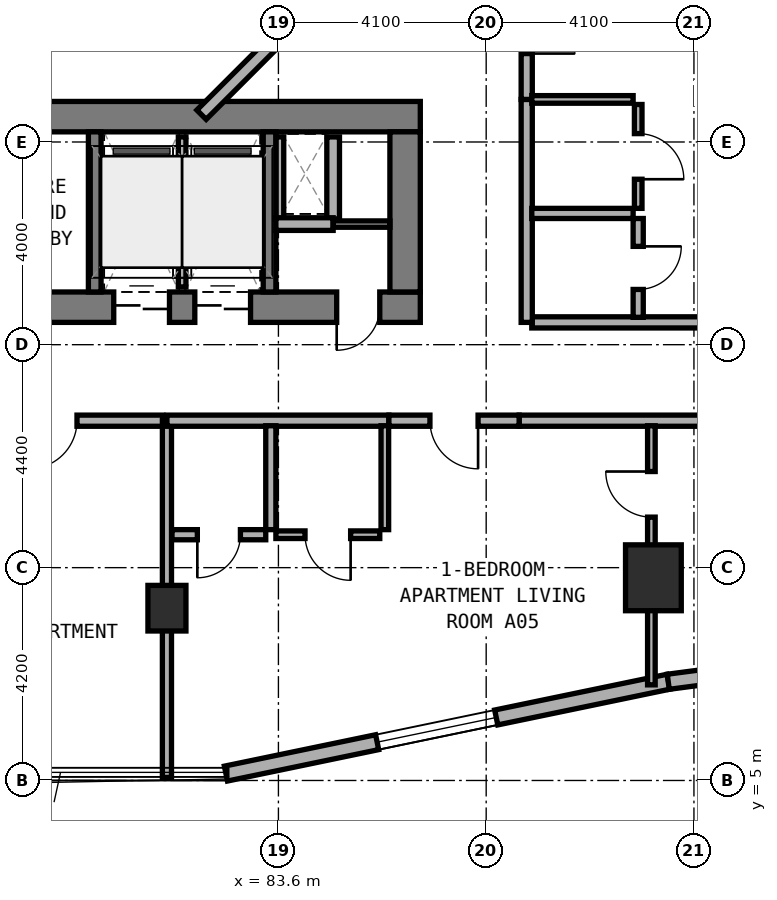
"""IFC4 building model, lengths in metres.
Left out: names, types, materials, properties, quantities, classifications, styles, units other than length and angle.
Written with IfcOpenShell. Run it as: python <this file> out.ifc"""

import sys

from ifc_helpers import new_model, si_unit, direction, frame, frame_2d, origin, origin_2d, place, context, subcontext, project, spatial, rectangle, extrude, element, fill, save


model = new_model("IFC4")
c1 = context("Model", 3, precision=1e-05, world=origin(), true_north=direction((0.0, 1.0)))
c2 = subcontext(c1, "Body", "Model", "MODEL_VIEW")
j1 = project(units=[si_unit("LENGTHUNIT", "METRE"), si_unit("PLANEANGLEUNIT", "RADIAN")], contexts=[c1])
p1 = place(None, origin())
s1 = spatial("IfcSite", under=j1, at=p1, CompositionType="ELEMENT")
p2 = place(p1, origin())
s2 = spatial("IfcBuilding", under=s1, at=p2, CompositionType="ELEMENT")
p3 = place(p2, frame((0.0, 0.0, 52.0)))
s3 = spatial("IfcBuildingStorey", under=s2, at=p3, CompositionType="ELEMENT", Elevation=52.0)
p4 = place(p3, frame((67.8, 14.34, 0.0), z_axis=(0.0, 0.0, 1.0), x_axis=(1.0, 0.0, 0.0)))
e1 = element("IfcWall", 1, at=p4, inside=s3, PredefinedType="SHEAR", context=c2, shape_type="SweptSolid", body=[
    extrude(rectangle(XDim=18.6, YDim=0.6, at=frame_2d((9.3, 0.0))), origin(), (0.0, 0.0, 1.0), 3.5),
])
p5 = place(p4, frame((9.35, 0.0, 0.0)))
e2 = element("IfcOpeningElement", 2, at=p5, cuts=e1, PredefinedType="OPENING", context=c2, shape_type="SweptSolid", body=[
    extrude(rectangle(XDim=1.2, YDim=2.15, at=frame_2d((0.6, 1.075))), frame((0.0, 0.31, 0.0), z_axis=(0.0, -1.0, 0.0), x_axis=(1.0, 0.0, 0.0)), (0.0, 0.0, 1.0), 0.62),
])
p6 = place(p4, frame((16.95, 0.0, 0.0)))
e3 = element("IfcOpeningElement", 3, at=p6, cuts=e1, PredefinedType="OPENING", context=c2, shape_type="SweptSolid", body=[
    extrude(rectangle(XDim=0.85, YDim=2.1, at=frame_2d((0.425, 1.05))), frame((0.0, 0.31, 0.0), z_axis=(0.0, -1.0, 0.0), x_axis=(1.0, 0.0, 0.0)), (0.0, 0.0, 1.0), 0.62),
])
p7 = place(p4, frame((12.55, 0.0, 0.0)))
e4 = element("IfcOpeningElement", 4, at=p7, cuts=e1, PredefinedType="OPENING", context=c2, shape_type="SweptSolid", body=[
    extrude(rectangle(XDim=1.1, YDim=2.15, at=frame_2d((0.55, 1.075))), frame((0.0, 0.31, 0.0), z_axis=(0.0, -1.0, 0.0), x_axis=(1.0, 0.0, 0.0)), (0.0, 0.0, 1.0), 0.62),
])
p8 = place(p4, frame((14.15, 0.0, 0.0)))
e5 = element("IfcOpeningElement", 5, at=p8, cuts=e1, PredefinedType="OPENING", context=c2, shape_type="SweptSolid", body=[
    extrude(rectangle(XDim=1.1, YDim=2.15, at=frame_2d((0.55, 1.075))), frame((0.0, 0.31, 0.0), z_axis=(0.0, -1.0, 0.0), x_axis=(1.0, 0.0, 0.0)), (0.0, 0.0, 1.0), 0.62),
])
p9 = place(p3, frame((67.8, 18.1, 0.0), z_axis=(0.0, 0.0, 1.0), x_axis=(1.0, 0.0, 0.0)))
e6 = element("IfcWall", 6, at=p9, inside=s3, PredefinedType="SHEAR", context=c2, shape_type="SweptSolid", body=[
    extrude(rectangle(XDim=18.6, YDim=0.6, at=frame_2d((9.3, 0.0))), origin(), (0.0, 0.0, 1.0), 3.5),
])
p10 = place(p3, frame((86.1, 14.64, 0.0), z_axis=(0.0, 0.0, 1.0), x_axis=(0.0, 1.0, 0.0)))
e7 = element("IfcWall", 7, at=p10, inside=s3, PredefinedType="SHEAR", context=c2, shape_type="SweptSolid", body=[
    extrude(rectangle(XDim=3.16, YDim=0.6, at=frame_2d((1.58, 0.0))), origin(), (0.0, 0.0, 1.0), 3.5),
])
for number, where, z_axis, x_axis in (
    (8, (79.975, 14.64, 0.0), (0.0, 0.0, 1.0), (0.0, 1.0, 0.0)),
    (9, (83.425, 14.64, 0.0), (0.0, 0.0, 1.0), (0.0, 1.0, 0.0)),
):
    element("IfcWall", number, at=place(p3, frame(where, z_axis=z_axis, x_axis=x_axis)), inside=s3, PredefinedType="STANDARD", context=c2, shape_type="SweptSolid", body=[
        extrude(rectangle(XDim=3.16, YDim=0.25, at=frame_2d((1.58, 0.0))), origin(), (0.0, 0.0, 1.0), 3.25),
    ])
p11 = place(p3, frame((81.4, 8.4, 0.0), z_axis=(0.0, 0.0, 1.0), x_axis=(1.0, 0.0, 0.0)))
e10 = element("IfcColumn", 10, at=p11, inside=s3, PredefinedType="COLUMN", context=c2, shape_type="SweptSolid", body=[
    extrude(rectangle(XDim=0.75, YDim=0.9, at=origin_2d()), origin(), (0.0, 0.0, 1.0), 3.5),
])
p12 = place(p3, frame((91.0, 9.0, 0.0), z_axis=(0.0, 0.0, 1.0), x_axis=(1.0, 0.0, 0.0)))
e11 = element("IfcColumn", 11, at=p12, inside=s3, PredefinedType="COLUMN", context=c2, shape_type="SweptSolid", body=[
    extrude(rectangle(XDim=1.1, YDim=1.3, at=origin_2d()), origin(), (0.0, 0.0, 1.0), 3.5),
])
p13 = place(p3, frame((82.564, 5.136, 0.0), z_axis=(0.0, 0.0, 1.0), x_axis=(0.979128391325, 0.203242695569, 0.0)))
e12 = element("IfcWall", 12, at=p13, inside=s3, PredefinedType="STANDARD", context=c2, shape_type="SweptSolid", body=[
    extrude(rectangle(XDim=8.92, YDim=0.3, at=frame_2d((4.46, 0.0))), origin(), (0.0, 0.0, 1.0), 3.25),
])
p14 = place(p13, frame((3.048, 0.0, 0.8)))
e13 = element("IfcOpeningElement", 13, at=p14, cuts=e12, PredefinedType="OPENING", context=c2, shape_type="SweptSolid", body=[
    extrude(rectangle(XDim=2.4, YDim=1.6, at=frame_2d((1.2, 0.8))), frame((0.0, 0.16, 0.0), z_axis=(0.0, -1.0, 0.0), x_axis=(1.0, 0.0, 0.0)), (0.0, 0.0, 1.0), 0.32),
])
p15 = place(p3, frame((91.293, 6.948, 0.0), z_axis=(0.0, 0.0, 1.0), x_axis=(0.991486167159, 0.13021205909, 0.0)))
e14 = element("IfcWall", 14, at=p15, inside=s3, PredefinedType="STANDARD", context=c2, shape_type="SweptSolid", body=[
    extrude(rectangle(XDim=0.729, YDim=0.3, at=frame_2d((0.365, 0.0))), origin(), (0.0, 0.0, 1.0), 3.25),
])
p16 = place(p3, frame((82.082, 18.138, 0.0), z_axis=(0.0, 0.0, 1.0), x_axis=(0.707106781187, 0.707106781187, 0.0)))
e15 = element("IfcWall", 15, at=p16, inside=s3, PredefinedType="STANDARD", context=c2, shape_type="SweptSolid", body=[
    extrude(rectangle(XDim=2.311, YDim=0.26, at=frame_2d((1.155, 0.0))), origin(), (0.0, 0.0, 1.0), 3.25),
])
p17 = place(p3, frame((83.63, 16.08, 0.0), z_axis=(0.0, 0.0, 1.0), x_axis=(0.0, 1.0, 0.0)))
e16 = element("IfcWall", 16, at=p17, inside=s3, PredefinedType="PARTITIONING", context=c2, shape_type="SweptSolid", body=[
    extrude(rectangle(XDim=1.62, YDim=0.15, at=frame_2d((0.81, 0.0))), origin(), (0.0, 0.0, 1.0), 2.725),
])
p18 = place(p3, frame((84.68, 16.08, 0.0), z_axis=(0.0, 0.0, 1.0), x_axis=(0.0, 1.0, 0.0)))
e17 = element("IfcWall", 17, at=p18, inside=s3, PredefinedType="SOLIDWALL", context=c2, shape_type="SweptSolid", body=[
    extrude(rectangle(XDim=1.62, YDim=0.25, at=frame_2d((0.81, 0.0))), origin(), (0.0, 0.0, 1.0), 3.22),
])
p19 = place(p3, frame((83.55, 15.98, 0.0), z_axis=(0.0, 0.0, 1.0), x_axis=(1.0, 0.0, 0.0)))
e18 = element("IfcWall", 18, at=p19, inside=s3, PredefinedType="SOLIDWALL", context=c2, shape_type="SweptSolid", body=[
    extrude(rectangle(XDim=1.13, YDim=0.25, at=frame_2d((0.565, 0.0))), origin(), (0.0, 0.0, 1.0), 3.22),
])
p20 = place(p3, frame((84.68, 15.98, 0.0), z_axis=(0.0, 0.0, 1.0), x_axis=(1.0, 0.0, 0.0)))
e19 = element("IfcWall", 19, at=p20, inside=s3, PredefinedType="PARTITIONING", context=c2, shape_type="SweptSolid", body=[
    extrude(rectangle(XDim=1.12, YDim=0.125, at=frame_2d((0.56, 0.0))), origin(), (0.0, 0.0, 1.0), 3.22),
])
p21 = place(p3, frame((81.7, 14.74, 0.0), z_axis=(0.0, 0.0, 1.0), x_axis=(0.0, 1.0, 0.0)))
e20 = element("IfcWall", 20, at=p21, inside=s3, PredefinedType="PARTITIONING", context=c2, shape_type="SweptSolid", body=[
    extrude(rectangle(XDim=2.96, YDim=0.15, at=frame_2d((1.48, 0.0))), origin(), (0.0, 0.0, 1.0), 3.22),
])
p22 = place(p3, frame((76.98, 12.1, 0.0), z_axis=(0.0, 0.0, 1.0), x_axis=(1.0, 0.0, 0.0)))
e21 = element("IfcWall", 21, at=p22, inside=s3, PredefinedType="SOLIDWALL", context=c2, shape_type="SweptSolid", body=[
    extrude(rectangle(XDim=4.34, YDim=0.22, at=frame_2d((2.17, 0.0))), origin(), (0.0, 0.0, 1.0), 2.725),
])
p23 = place(p22, frame((1.695, 0.0, 0.0)))
e22 = element("IfcOpeningElement", 22, at=p23, cuts=e21, PredefinedType="OPENING", context=c2, shape_type="SweptSolid", body=[
    extrude(rectangle(XDim=0.95, YDim=2.1, at=frame_2d((0.475, 1.05))), frame((0.0, 0.12, 0.0), z_axis=(0.0, -1.0, 0.0), x_axis=(1.0, 0.0, 0.0)), (0.0, 0.0, 1.0), 0.24),
])
p24 = place(p3, frame((81.4, 5.06, 0.0), z_axis=(0.0, 0.0, 1.0), x_axis=(0.0, 1.0, 0.0)))
e23 = element("IfcWall", 23, at=p24, inside=s3, PredefinedType="SOLIDWALL", context=c2, shape_type="SweptSolid", body=[
    extrude(rectangle(XDim=7.04, YDim=0.18, at=frame_2d((3.52, 0.0))), origin(), (0.0, 0.0, 1.0), 2.725),
])
p25 = place(p3, frame((81.4, 12.1, 0.0), z_axis=(0.0, 0.0, 1.0), x_axis=(1.0, 0.0, 0.0)))
e24 = element("IfcWall", 24, at=p25, inside=s3, PredefinedType="SOLIDWALL", context=c2, shape_type="SweptSolid", body=[
    extrude(rectangle(XDim=4.38, YDim=0.22, at=frame_2d((2.19, 0.0))), origin(), (0.0, 0.0, 1.0), 2.725),
])
p26 = place(p3, frame((88.35, 12.1, 0.0), z_axis=(0.0, 0.0, 1.0), x_axis=(1.0, 0.0, 0.0)))
e25 = element("IfcWall", 25, at=p26, inside=s3, PredefinedType="SOLIDWALL", context=c2, shape_type="SweptSolid", body=[
    extrude(rectangle(XDim=7.41, YDim=0.22, at=frame_2d((3.705, 0.0))), origin(), (0.0, 0.0, 1.0), 2.865),
])
p27 = place(p3, frame((85.78, 12.1, 0.0), z_axis=(0.0, 0.0, 1.0), x_axis=(1.0, 0.0, 0.0)))
e26 = element("IfcWall", 26, at=p27, inside=s3, PredefinedType="SOLIDWALL", context=c2, shape_type="SweptSolid", body=[
    extrude(rectangle(XDim=2.57, YDim=0.22, at=frame_2d((1.285, 0.0))), origin(), (0.0, 0.0, 1.0), 3.22),
])
p28 = place(p27, frame((0.81, 0.0, 0.0)))
e27 = element("IfcOpeningElement", 27, at=p28, cuts=e26, PredefinedType="OPENING", context=c2, shape_type="SweptSolid", body=[
    extrude(rectangle(XDim=0.95, YDim=2.1, at=frame_2d((0.475, 1.05))), frame((0.0, 0.12, 0.0), z_axis=(0.0, -1.0, 0.0), x_axis=(1.0, 0.0, 0.0)), (0.0, 0.0, 1.0), 0.24),
])
p29 = place(p3, frame((90.96, 6.887, 0.0), z_axis=(0.0, 0.0, 1.0), x_axis=(0.0, 1.0, 0.0)))
e28 = element("IfcWall", 28, at=p29, inside=s3, PredefinedType="PARTITIONING", context=c2, shape_type="SweptSolid", body=[
    extrude(rectangle(XDim=5.113, YDim=0.15, at=frame_2d((2.557, 0.0))), origin(), (0.0, 0.0, 1.0), 2.865),
])
p30 = place(p29, frame((3.31, 0.0, 0.0)))
e29 = element("IfcOpeningElement", 29, at=p30, cuts=e28, PredefinedType="OPENING", context=c2, shape_type="SweptSolid", body=[
    extrude(rectangle(XDim=0.9, YDim=2.1, at=frame_2d((0.45, 1.05))), frame((0.0, 0.085, 0.0), z_axis=(0.0, -1.0, 0.0), x_axis=(1.0, 0.0, 0.0)), (0.0, 0.0, 1.0), 0.17),
])
p31 = place(p3, frame((83.45, 9.95, 0.0), z_axis=(0.0, 0.0, 1.0), x_axis=(0.0, 1.0, 0.0)))
e30 = element("IfcWall", 30, at=p31, inside=s3, PredefinedType="PLUMBINGWALL", context=c2, shape_type="SweptSolid", body=[
    extrude(rectangle(XDim=2.05, YDim=0.2, at=frame_2d((1.025, 0.0))), origin(), (0.0, 0.0, 1.0), 3.22),
])
p32 = place(p3, frame((85.7, 9.95, 0.0), z_axis=(0.0, 0.0, 1.0), x_axis=(0.0, 1.0, 0.0)))
e31 = element("IfcWall", 31, at=p32, inside=s3, PredefinedType="PARTITIONING", context=c2, shape_type="SweptSolid", body=[
    extrude(rectangle(XDim=2.05, YDim=0.15, at=frame_2d((1.025, 0.0))), origin(), (0.0, 0.0, 1.0), 3.22),
])
p33 = place(p3, frame((81.5, 9.85, 0.0), z_axis=(0.0, 0.0, 1.0), x_axis=(1.0, 0.0, 0.0)))
e32 = element("IfcWall", 32, at=p33, inside=s3, PredefinedType="PLUMBINGWALL", context=c2, shape_type="SweptSolid", body=[
    extrude(rectangle(XDim=1.85, YDim=0.2, at=frame_2d((0.925, 0.0))), origin(), (0.0, 0.0, 1.0), 2.725),
])
p34 = place(p33, frame((0.5, 0.0, 0.0)))
e33 = element("IfcOpeningElement", 33, at=p34, cuts=e32, PredefinedType="OPENING", context=c2, shape_type="SweptSolid", body=[
    extrude(rectangle(XDim=0.85, YDim=2.1, at=frame_2d((0.425, 1.05))), frame((0.0, 0.11, 0.0), z_axis=(0.0, -1.0, 0.0), x_axis=(1.0, 0.0, 0.0)), (0.0, 0.0, 1.0), 0.22),
])
p35 = place(p3, frame((83.55, 9.85, 0.0), z_axis=(0.0, 0.0, 1.0), x_axis=(1.0, 0.0, 0.0)))
e34 = element("IfcWall", 34, at=p35, inside=s3, PredefinedType="PARTITIONING", context=c2, shape_type="SweptSolid", body=[
    extrude(rectangle(XDim=2.05, YDim=0.15, at=frame_2d((1.025, 0.0))), origin(), (0.0, 0.0, 1.0), 3.22),
])
p36 = place(p35, frame((0.575, 0.0, 0.0)))
e35 = element("IfcOpeningElement", 35, at=p36, cuts=e34, PredefinedType="OPENING", context=c2, shape_type="SweptSolid", body=[
    extrude(rectangle(XDim=0.9, YDim=2.1, at=frame_2d((0.45, 1.05))), frame((0.0, 0.085, 0.0), z_axis=(0.0, -1.0, 0.0), x_axis=(1.0, 0.0, 0.0)), (0.0, 0.0, 1.0), 0.17),
])
p37 = place(p3, frame((88.6, 14.04, 0.0), z_axis=(0.0, 0.0, 1.0), x_axis=(1.0, 0.0, 0.0)))
e36 = element("IfcWall", 36, at=p37, inside=s3, PredefinedType="SOLIDWALL", context=c2, shape_type="SweptSolid", body=[
    extrude(rectangle(XDim=7.0, YDim=0.22, at=frame_2d((3.5, 0.0))), origin(), (0.0, 0.0, 1.0), 2.865),
])
p38 = place(p3, frame((88.5, 14.04, 0.0), z_axis=(0.0, 0.0, 1.0), x_axis=(0.0, 1.0, 0.0)))
e37 = element("IfcWall", 37, at=p38, inside=s3, PredefinedType="SOLIDWALL", context=c2, shape_type="SweptSolid", body=[
    extrude(rectangle(XDim=4.4, YDim=0.22, at=frame_2d((2.2, 0.0))), origin(), (0.0, 0.0, 1.0), 3.22),
])
p39 = place(p3, frame((88.5, 18.44, 0.0), z_axis=(0.0, 0.0, 1.0), x_axis=(0.0, 1.0, 0.0)))
e38 = element("IfcWall", 38, at=p39, inside=s3, PredefinedType="SOLIDWALL", context=c2, shape_type="SweptSolid", body=[
    extrude(rectangle(XDim=6.56, YDim=0.22, at=frame_2d((3.28, 0.0))), origin(), (0.0, 0.0, 1.0), 2.725),
])
p40 = place(p39, frame((0.905, 0.0, 0.0)))
e39 = element("IfcOpeningElement", 39, at=p40, cuts=e38, PredefinedType="OPENING", context=c2, shape_type="SweptSolid", body=[
    extrude(rectangle(XDim=0.95, YDim=2.1, at=frame_2d((0.475, 1.05))), frame((0.0, 0.12, 0.0), z_axis=(0.0, -1.0, 0.0), x_axis=(1.0, 0.0, 0.0)), (0.0, 0.0, 1.0), 0.24),
])
p41 = place(p3, frame((88.6, 16.19, 0.0), z_axis=(0.0, 0.0, 1.0), x_axis=(1.0, 0.0, 0.0)))
e40 = element("IfcWall", 40, at=p41, inside=s3, PredefinedType="PLUMBINGWALL", context=c2, shape_type="SweptSolid", body=[
    extrude(rectangle(XDim=2.0, YDim=0.2, at=frame_2d((1.0, 0.0))), origin(), (0.0, 0.0, 1.0), 3.22),
])
p42 = place(p3, frame((88.6, 18.44, 0.0), z_axis=(0.0, 0.0, 1.0), x_axis=(1.0, 0.0, 0.0)))
e41 = element("IfcWall", 41, at=p42, inside=s3, PredefinedType="PARTITIONING", context=c2, shape_type="SweptSolid", body=[
    extrude(rectangle(XDim=2.0, YDim=0.15, at=frame_2d((1.0, 0.0))), origin(), (0.0, 0.0, 1.0), 3.22),
])
p43 = place(p3, frame((90.7, 14.14, 0.0), z_axis=(0.0, 0.0, 1.0), x_axis=(0.0, 1.0, 0.0)))
e42 = element("IfcWall", 42, at=p43, inside=s3, PredefinedType="PLUMBINGWALL", context=c2, shape_type="SweptSolid", body=[
    extrude(rectangle(XDim=1.95, YDim=0.2, at=frame_2d((0.975, 0.0))), origin(), (0.0, 0.0, 1.0), 3.22),
])
p44 = place(p43, frame((0.55, 0.0, 0.0)))
e43 = element("IfcOpeningElement", 43, at=p44, cuts=e42, PredefinedType="OPENING", context=c2, shape_type="SweptSolid", body=[
    extrude(rectangle(XDim=0.85, YDim=2.1, at=frame_2d((0.425, 1.05))), frame((0.0, 0.11, 0.0), z_axis=(0.0, -1.0, 0.0), x_axis=(1.0, 0.0, 0.0)), (0.0, 0.0, 1.0), 0.22),
])
p45 = place(p3, frame((90.7, 16.29, 0.0), z_axis=(0.0, 0.0, 1.0), x_axis=(0.0, 1.0, 0.0)))
e44 = element("IfcWall", 44, at=p45, inside=s3, PredefinedType="PARTITIONING", context=c2, shape_type="SweptSolid", body=[
    extrude(rectangle(XDim=2.05, YDim=0.15, at=frame_2d((1.025, 0.0))), origin(), (0.0, 0.0, 1.0), 3.22),
])
p46 = place(p45, frame((0.575, 0.0, 0.0)))
e45 = element("IfcOpeningElement", 45, at=p46, cuts=e44, PredefinedType="OPENING", context=c2, shape_type="SweptSolid", body=[
    extrude(rectangle(XDim=0.9, YDim=2.1, at=frame_2d((0.45, 1.05))), frame((0.0, 0.085, 0.0), z_axis=(0.0, -1.0, 0.0), x_axis=(1.0, 0.0, 0.0)), (0.0, 0.0, 1.0), 0.17),
])
p47 = place(p14, origin())
e46 = element("IfcWindow", 46, at=p47, inside=s3, PartitioningType="SINGLE_PANEL", PredefinedType="WINDOW", context=c2, shape_type="SweptSolid", body=[
    extrude(rectangle(XDim=2.4, YDim=1.6, at=frame_2d((1.2, 0.8))), frame((0.0, 0.03, 0.0), z_axis=(0.0, -1.0, 0.0), x_axis=(1.0, 0.0, 0.0)), (0.0, 0.0, 1.0), 0.06),
])
fill(e13, e46)
p48 = place(p6, frame((0.85, 0.0, 0.0), z_axis=(0.0, 0.0, 1.0), x_axis=(-1.0, 0.0, 0.0)))
e47 = element("IfcDoor", 47, at=p48, inside=s3, OperationType="SINGLE_SWING_RIGHT", PredefinedType="DOOR", context=c2, shape_type="SweptSolid", body=[
    extrude(rectangle(XDim=0.85, YDim=2.1, at=frame_2d((0.425, 1.05))), frame((0.0, 0.025, 0.0), z_axis=(0.0, -1.0, 0.0), x_axis=(1.0, 0.0, 0.0)), (0.0, 0.0, 1.0), 0.05),
])
fill(e3, e47)
p49 = place(p7, frame((1.1, 0.0, 0.0), z_axis=(0.0, 0.0, 1.0), x_axis=(-1.0, 0.0, 0.0)))
e48 = element("IfcDoor", 48, at=p49, inside=s3, OperationType="DOUBLE_DOOR_SLIDING", PredefinedType="DOOR", context=c2, shape_type="SweptSolid", body=[
    extrude(rectangle(XDim=1.1, YDim=2.15, at=frame_2d((0.55, 1.075))), frame((0.0, 0.025, 0.0), z_axis=(0.0, -1.0, 0.0), x_axis=(1.0, 0.0, 0.0)), (0.0, 0.0, 1.0), 0.05),
])
fill(e4, e48)
p50 = place(p8, frame((1.1, 0.0, 0.0), z_axis=(0.0, 0.0, 1.0), x_axis=(-1.0, 0.0, 0.0)))
e49 = element("IfcDoor", 49, at=p50, inside=s3, OperationType="DOUBLE_DOOR_SLIDING", PredefinedType="DOOR", context=c2, shape_type="SweptSolid", body=[
    extrude(rectangle(XDim=1.1, YDim=2.15, at=frame_2d((0.55, 1.075))), frame((0.0, 0.025, 0.0), z_axis=(0.0, -1.0, 0.0), x_axis=(1.0, 0.0, 0.0)), (0.0, 0.0, 1.0), 0.05),
])
fill(e5, e49)
p51 = place(p23, frame((0.95, 0.0, 0.0), z_axis=(0.0, 0.0, 1.0), x_axis=(-1.0, 0.0, 0.0)))
e50 = element("IfcDoor", 50, at=p51, inside=s3, OperationType="SINGLE_SWING_RIGHT", PredefinedType="DOOR", context=c2, shape_type="SweptSolid", body=[
    extrude(rectangle(XDim=0.95, YDim=2.1, at=frame_2d((0.475, 1.05))), frame((0.0, 0.025, 0.0), z_axis=(0.0, -1.0, 0.0), x_axis=(1.0, 0.0, 0.0)), (0.0, 0.0, 1.0), 0.05),
])
fill(e22, e50)
p52 = place(p28, frame((0.95, 0.0, 0.0), z_axis=(0.0, 0.0, 1.0), x_axis=(-1.0, 0.0, 0.0)))
e51 = element("IfcDoor", 51, at=p52, inside=s3, OperationType="SINGLE_SWING_LEFT", PredefinedType="DOOR", context=c2, shape_type="SweptSolid", body=[
    extrude(rectangle(XDim=0.95, YDim=2.1, at=frame_2d((0.475, 1.05))), frame((0.0, 0.025, 0.0), z_axis=(0.0, -1.0, 0.0), x_axis=(1.0, 0.0, 0.0)), (0.0, 0.0, 1.0), 0.05),
])
fill(e27, e51)
p53 = place(p30, origin())
e52 = element("IfcDoor", 52, at=p53, inside=s3, OperationType="SINGLE_SWING_RIGHT", PredefinedType="DOOR", context=c2, shape_type="SweptSolid", body=[
    extrude(rectangle(XDim=0.9, YDim=2.1, at=frame_2d((0.45, 1.05))), frame((0.0, 0.025, 0.0), z_axis=(0.0, -1.0, 0.0), x_axis=(1.0, 0.0, 0.0)), (0.0, 0.0, 1.0), 0.05),
])
fill(e29, e52)
p54 = place(p34, frame((0.85, 0.0, 0.0), z_axis=(0.0, 0.0, 1.0), x_axis=(-1.0, 0.0, 0.0)))
e53 = element("IfcDoor", 53, at=p54, inside=s3, OperationType="SINGLE_SWING_RIGHT", PredefinedType="DOOR", context=c2, shape_type="SweptSolid", body=[
    extrude(rectangle(XDim=0.85, YDim=2.1, at=frame_2d((0.425, 1.05))), frame((0.0, 0.025, 0.0), z_axis=(0.0, -1.0, 0.0), x_axis=(1.0, 0.0, 0.0)), (0.0, 0.0, 1.0), 0.05),
])
fill(e33, e53)
p55 = place(p36, frame((0.9, 0.0, 0.0), z_axis=(0.0, 0.0, 1.0), x_axis=(-1.0, 0.0, 0.0)))
e54 = element("IfcDoor", 54, at=p55, inside=s3, OperationType="SINGLE_SWING_LEFT", PredefinedType="DOOR", context=c2, shape_type="SweptSolid", body=[
    extrude(rectangle(XDim=0.9, YDim=2.1, at=frame_2d((0.45, 1.05))), frame((0.0, 0.025, 0.0), z_axis=(0.0, -1.0, 0.0), x_axis=(1.0, 0.0, 0.0)), (0.0, 0.0, 1.0), 0.05),
])
fill(e35, e54)
p56 = place(p40, frame((0.95, 0.0, 0.0), z_axis=(0.0, 0.0, 1.0), x_axis=(-1.0, 0.0, 0.0)))
e55 = element("IfcDoor", 55, at=p56, inside=s3, OperationType="SINGLE_SWING_RIGHT", PredefinedType="DOOR", context=c2, shape_type="SweptSolid", body=[
    extrude(rectangle(XDim=0.95, YDim=2.1, at=frame_2d((0.475, 1.05))), frame((0.0, 0.025, 0.0), z_axis=(0.0, -1.0, 0.0), x_axis=(1.0, 0.0, 0.0)), (0.0, 0.0, 1.0), 0.05),
])
fill(e39, e55)
p57 = place(p44, frame((0.85, 0.0, 0.0), z_axis=(0.0, 0.0, 1.0), x_axis=(-1.0, 0.0, 0.0)))
e56 = element("IfcDoor", 56, at=p57, inside=s3, OperationType="SINGLE_SWING_LEFT", PredefinedType="DOOR", context=c2, shape_type="SweptSolid", body=[
    extrude(rectangle(XDim=0.85, YDim=2.1, at=frame_2d((0.425, 1.05))), frame((0.0, 0.025, 0.0), z_axis=(0.0, -1.0, 0.0), x_axis=(1.0, 0.0, 0.0)), (0.0, 0.0, 1.0), 0.05),
])
fill(e43, e56)
p58 = place(p46, frame((0.9, 0.0, 0.0), z_axis=(0.0, 0.0, 1.0), x_axis=(-1.0, 0.0, 0.0)))
e57 = element("IfcDoor", 57, at=p58, inside=s3, OperationType="SINGLE_SWING_RIGHT", PredefinedType="DOOR", context=c2, shape_type="SweptSolid", body=[
    extrude(rectangle(XDim=0.9, YDim=2.1, at=frame_2d((0.45, 1.05))), frame((0.0, 0.025, 0.0), z_axis=(0.0, -1.0, 0.0), x_axis=(1.0, 0.0, 0.0)), (0.0, 0.0, 1.0), 0.05),
])
fill(e45, e57)
save(model, sys.argv[1])
